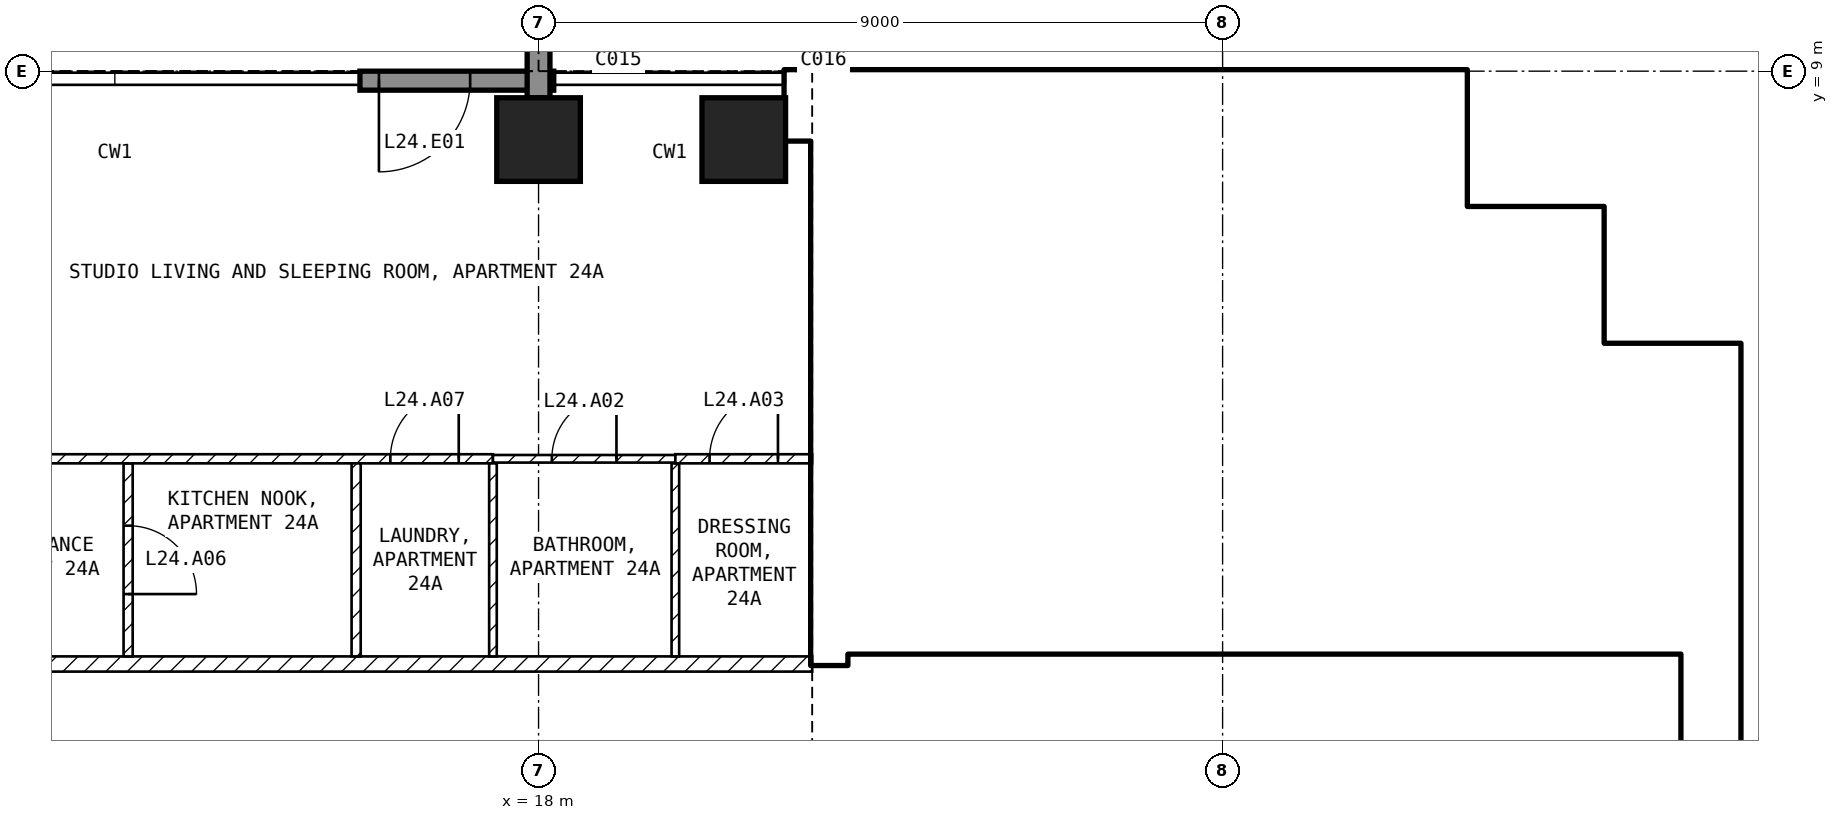
"""IFC4 building model, lengths in metres.
Left out: names, types, materials, properties, quantities, classifications, styles, units other than length and angle.
Written with IfcOpenShell. Run it as: python <this file> out.ifc"""

import sys

from ifc_helpers import new_model, si_unit, direction, frame, frame_2d, origin, origin_2d, place, context, subcontext, project, spatial, rectangle, extrude, element, fill, save


model = new_model("IFC4")
c1 = context("Model", 3, precision=1e-05, world=origin(), true_north=direction((0.0, 1.0)))
c2 = subcontext(c1, "Body", "Model", "MODEL_VIEW")
j1 = project(units=[si_unit("LENGTHUNIT", "METRE"), si_unit("PLANEANGLEUNIT", "RADIAN")], contexts=[c1])
p1 = place(None, origin())
s1 = spatial("IfcSite", under=j1, at=p1, CompositionType="ELEMENT")
p2 = place(p1, origin())
s2 = spatial("IfcBuilding", under=s1, at=p2, CompositionType="ELEMENT")
p3 = place(p2, frame((0.0, 0.0, 105.9)))
s3 = spatial("IfcBuildingStorey", under=s2, at=p3, CompositionType="ELEMENT", Elevation=105.9)
for number, where, z_axis, x_axis in (
    (1, (18.0, 8.1, -0.25), (0.0, 0.0, 1.0), (1.0, 0.0, 0.0)),
    (2, (20.7, 8.1, -0.25), (0.0, 0.0, 1.0), (1.0, 0.0, 0.0)),
):
    element("IfcColumn", number, at=place(p3, frame(where, z_axis=z_axis, x_axis=x_axis)), inside=s3, PredefinedType="COLUMN", context=c2, shape_type="SweptSolid", body=[
        extrude(rectangle(XDim=1.1, YDim=1.1, at=origin_2d()), origin(), (0.0, 0.0, 1.0), 3.5),
    ])
p4 = place(p3, frame((18.2, 8.875, 0.0), z_axis=(0.0, 0.0, 1.0), x_axis=(-1.0, 0.0, 0.0)))
e3 = element("IfcWall", 3, at=p4, inside=s3, PredefinedType="SOLIDWALL", context=c2, shape_type="SweptSolid", body=[
    extrude(rectangle(XDim=2.55, YDim=0.25, at=frame_2d((1.275, 0.0))), origin(), (0.0, 0.0, 1.0), 3.25),
])
p5 = place(p4, frame((1.1, 0.0, 0.0)))
e4 = element("IfcOpeningElement", 4, at=p5, cuts=e3, PredefinedType="OPENING", context=c2, shape_type="SweptSolid", body=[
    extrude(rectangle(XDim=1.2, YDim=2.4, at=frame_2d((0.6, 1.2))), frame((0.0, 0.135, 0.0), z_axis=(0.0, -1.0, 0.0), x_axis=(1.0, 0.0, 0.0)), (0.0, 0.0, 1.0), 0.27),
])
p6 = place(p3, frame((18.0, 8.65, 0.0), z_axis=(0.0, 0.0, 1.0), x_axis=(0.0, 1.0, 0.0)))
e5 = element("IfcWall", 5, at=p6, inside=s3, PredefinedType="SOLIDWALL", context=c2, shape_type="SweptSolid", body=[
    extrude(rectangle(XDim=3.09, YDim=0.3, at=frame_2d((1.545, 0.0))), origin(), (0.0, 0.0, 1.0), 3.25),
])
p7 = place(p3, frame((33.425, -4.65, 0.0), z_axis=(0.0, 0.0, 1.0), x_axis=(0.0, 1.0, 0.0)))
e6 = element("IfcWall", 6, at=p7, inside=s3, PredefinedType="SHEAR", context=c2, shape_type="SweptSolid", body=[
    extrude(rectangle(XDim=10.05, YDim=0.75, at=frame_2d((5.025, 0.0))), origin(), (0.0, 0.0, 1.0), 3.25),
])
for number, where, z_axis, x_axis in (
    (7, (31.25, 5.025, 0.0), (0.0, 0.0, 1.0), (1.0, 0.0, 0.0)),
    (8, (31.625, 5.4, 0.0), (0.0, 0.0, 1.0), (0.0, 1.0, 0.0)),
):
    element("IfcWall", number, at=place(p3, frame(where, z_axis=z_axis, x_axis=x_axis)), inside=s3, PredefinedType="SHEAR", context=c2, shape_type="SweptSolid", body=[
        extrude(rectangle(XDim=1.8, YDim=0.75, at=frame_2d((0.9, 0.0))), origin(), (0.0, 0.0, 1.0), 3.25),
    ])
p8 = place(p3, frame((29.075, 6.825, 0.0), z_axis=(0.0, 0.0, 1.0), x_axis=(1.0, 0.0, 0.0)))
e9 = element("IfcWall", 9, at=p8, inside=s3, PredefinedType="SHEAR", context=c2, shape_type="SweptSolid", body=[
    extrude(rectangle(XDim=2.175, YDim=0.75, at=frame_2d((1.087, 0.0))), origin(), (0.0, 0.0, 1.0), 3.25),
])
p9 = place(p3, frame((29.825, 7.2, 0.0), z_axis=(0.0, 0.0, 1.0), x_axis=(0.0, 1.0, 0.0)))
e10 = element("IfcWall", 10, at=p9, inside=s3, PredefinedType="SHEAR", context=c2, shape_type="SweptSolid", body=[
    extrude(rectangle(XDim=1.8, YDim=0.75, at=frame_2d((0.9, 0.0))), origin(), (0.0, 0.0, 1.0), 3.25),
])
p10 = place(p3, frame((21.25, 8.55, 0.0), z_axis=(0.0, 0.0, 1.0), x_axis=(1.0, 0.0, 0.0)))
e11 = element("IfcWall", 11, at=p10, inside=s3, PredefinedType="SHEAR", context=c2, shape_type="SweptSolid", body=[
    extrude(rectangle(XDim=8.2, YDim=0.9, at=frame_2d((4.1, 0.0))), origin(), (0.0, 0.0, 1.0), 3.25),
])
p11 = place(p3, frame((21.825, 1.2, 0.0), z_axis=(0.0, 0.0, 1.0), x_axis=(0.0, 1.0, 0.0)))
e12 = element("IfcWall", 12, at=p11, inside=s3, PredefinedType="SHEAR", context=c2, shape_type="SweptSolid", body=[
    extrude(rectangle(XDim=6.9, YDim=0.45, at=frame_2d((3.45, 0.0))), origin(), (0.0, 0.0, 1.0), 3.25),
])
p12 = place(p3, frame((22.05, 1.45, 0.0), z_axis=(0.0, 0.0, 1.0), x_axis=(1.0, 0.0, 0.0)))
e13 = element("IfcWall", 13, at=p12, inside=s3, PredefinedType="SOLIDWALL", context=c2, shape_type="SweptSolid", body=[
    extrude(rectangle(XDim=11.0, YDim=0.2, at=frame_2d((5.5, 0.0))), origin(), (0.0, 0.0, 1.0), 3.25),
])
p13 = place(p12, frame((0.75, 0.0, 0.0)))
e14 = element("IfcOpeningElement", 14, at=p13, cuts=e13, PredefinedType="OPENING", context=c2, shape_type="SweptSolid", body=[
    extrude(rectangle(XDim=1.0, YDim=2.1, at=frame_2d((0.5, 1.05))), frame((0.0, 0.11, 0.0), z_axis=(0.0, -1.0, 0.0), x_axis=(1.0, 0.0, 0.0)), (0.0, 0.0, 1.0), 0.22),
])
p14 = place(p12, frame((3.25, 0.0, 0.0)))
e15 = element("IfcOpeningElement", 15, at=p14, cuts=e13, PredefinedType="OPENING", context=c2, shape_type="SweptSolid", body=[
    extrude(rectangle(XDim=1.0, YDim=2.1, at=frame_2d((0.5, 1.05))), frame((0.0, 0.11, 0.0), z_axis=(0.0, -1.0, 0.0), x_axis=(1.0, 0.0, 0.0)), (0.0, 0.0, 1.0), 0.22),
])
p15 = place(p12, frame((9.075, 0.0, 0.0)))
e16 = element("IfcOpeningElement", 16, at=p15, cuts=e13, PredefinedType="OPENING", context=c2, shape_type="SweptSolid", body=[
    extrude(rectangle(XDim=0.9, YDim=2.1, at=frame_2d((0.45, 1.05))), frame((0.0, 0.11, 0.0), z_axis=(0.0, -1.0, 0.0), x_axis=(1.0, 0.0, 0.0)), (0.0, 0.0, 1.0), 0.22),
])
p16 = place(p3, frame((22.05, 5.15, 0.0), z_axis=(0.0, 0.0, 1.0), x_axis=(1.0, 0.0, 0.0)))
e17 = element("IfcWall", 17, at=p16, inside=s3, PredefinedType="SOLIDWALL", context=c2, shape_type="SweptSolid", body=[
    extrude(rectangle(XDim=6.3, YDim=0.2, at=frame_2d((3.15, 0.0))), origin(), (0.0, 0.0, 1.0), 3.25),
])
p17 = place(p16, frame((0.2, 0.0, 0.0)))
e18 = element("IfcOpeningElement", 18, at=p17, cuts=e17, PredefinedType="OPENING", context=c2, shape_type="SweptSolid", body=[
    extrude(rectangle(XDim=1.0, YDim=2.1, at=frame_2d((0.5, 1.05))), frame((0.0, 0.11, 0.0), z_axis=(0.0, -1.0, 0.0), x_axis=(1.0, 0.0, 0.0)), (0.0, 0.0, 1.0), 0.22),
])
p18 = place(p3, frame((28.25, 5.25, 0.0), z_axis=(0.0, 0.0, 1.0), x_axis=(0.0, 1.0, 0.0)))
e19 = element("IfcWall", 19, at=p18, inside=s3, PredefinedType="SOLIDWALL", context=c2, shape_type="SweptSolid", body=[
    extrude(rectangle(XDim=2.85, YDim=0.2, at=frame_2d((1.425, 0.0))), origin(), (0.0, 0.0, 1.0), 3.25),
])
p19 = place(p3, frame((27.2, 3.95, 0.0), z_axis=(0.0, 0.0, 1.0), x_axis=(1.0, 0.0, 0.0)))
e20 = element("IfcWall", 20, at=p19, inside=s3, PredefinedType="SOLIDWALL", context=c2, shape_type="SweptSolid", body=[
    extrude(rectangle(XDim=5.85, YDim=0.2, at=frame_2d((2.925, 0.0))), origin(), (0.0, 0.0, 1.0), 3.25),
])
p20 = place(p3, frame((27.1, 1.55, 0.0), z_axis=(0.0, 0.0, 1.0), x_axis=(0.0, 1.0, 0.0)))
e21 = element("IfcWall", 21, at=p20, inside=s3, PredefinedType="SOLIDWALL", context=c2, shape_type="SweptSolid", body=[
    extrude(rectangle(XDim=3.5, YDim=0.2, at=frame_2d((1.75, 0.0))), origin(), (0.0, 0.0, 1.0), 3.25),
])
p21 = place(p20, frame((0.6, 0.0, 0.0)))
e22 = element("IfcOpeningElement", 22, at=p21, cuts=e21, PredefinedType="OPENING", context=c2, shape_type="SweptSolid", body=[
    extrude(rectangle(XDim=1.1, YDim=2.1, at=frame_2d((0.55, 1.05))), frame((0.0, 0.11, 0.0), z_axis=(0.0, -1.0, 0.0), x_axis=(1.0, 0.0, 0.0)), (0.0, 0.0, 1.0), 0.22),
])
p22 = place(p20, frame((2.6, 0.0, 0.0)))
e23 = element("IfcOpeningElement", 23, at=p22, cuts=e21, PredefinedType="OPENING", context=c2, shape_type="SweptSolid", body=[
    extrude(rectangle(XDim=0.8, YDim=2.1, at=frame_2d((0.4, 1.05))), frame((0.0, 0.11, 0.0), z_axis=(0.0, -1.0, 0.0), x_axis=(1.0, 0.0, 0.0)), (0.0, 0.0, 1.0), 0.22),
])
p23 = place(p3, frame((30.0, 1.55, 0.0), z_axis=(0.0, 0.0, 1.0), x_axis=(0.0, 1.0, 0.0)))
e24 = element("IfcWall", 24, at=p23, inside=s3, PredefinedType="SOLIDWALL", context=c2, shape_type="SweptSolid", body=[
    extrude(rectangle(XDim=2.3, YDim=0.2, at=frame_2d((1.15, 0.0))), origin(), (0.0, 0.0, 1.0), 3.25),
])
p24 = place(p3, frame((29.0, 4.05, 0.0), z_axis=(0.0, 0.0, 1.0), x_axis=(0.0, 1.0, 0.0)))
e25 = element("IfcWall", 25, at=p24, inside=s3, PredefinedType="PARTITIONING", context=c2, shape_type="SweptSolid", body=[
    extrude(rectangle(XDim=4.05, YDim=0.15, at=frame_2d((2.025, 0.0))), origin(), (0.0, 0.0, 1.0), 3.25),
])
p25 = place(p24, frame((0.1, 0.0, 0.0)))
e26 = element("IfcOpeningElement", 26, at=p25, cuts=e25, PredefinedType="OPENING", context=c2, shape_type="SweptSolid", body=[
    extrude(rectangle(XDim=0.8, YDim=2.1, at=frame_2d((0.4, 1.05))), frame((0.0, 0.085, 0.0), z_axis=(0.0, -1.0, 0.0), x_axis=(1.0, 0.0, 0.0)), (0.0, 0.0, 1.0), 0.17),
])
p26 = place(p3, frame((4.4, 1.2, 0.0), z_axis=(0.0, 0.0, 1.0), x_axis=(1.0, 0.0, 0.0)))
e27 = element("IfcWall", 27, at=p26, inside=s3, PredefinedType="PARTITIONING", context=c2, shape_type="SweptSolid", body=[
    extrude(rectangle(XDim=17.2, YDim=0.2, at=frame_2d((8.6, 0.0))), origin(), (0.0, 0.0, 1.0), 3.25),
])
p27 = place(p26, frame((5.9, 0.0, 0.0)))
e28 = element("IfcOpeningElement", 28, at=p27, cuts=e27, PredefinedType="OPENING", context=c2, shape_type="SweptSolid", body=[
    extrude(rectangle(XDim=1.0, YDim=2.1, at=frame_2d((0.5, 1.05))), frame((0.0, 0.11, 0.0), z_axis=(0.0, -1.0, 0.0), x_axis=(1.0, 0.0, 0.0)), (0.0, 0.0, 1.0), 0.22),
])
p28 = place(p3, frame((12.6, 3.84, 0.0), z_axis=(0.0, 0.0, 1.0), x_axis=(0.0, -1.0, 0.0)))
e29 = element("IfcWall", 29, at=p28, inside=s3, PredefinedType="PARTITIONING", context=c2, shape_type="SweptSolid", body=[
    extrude(rectangle(XDim=2.54, YDim=0.12, at=frame_2d((1.27, 0.0))), origin(), (0.0, 0.0, 1.0), 3.25),
])
p29 = place(p28, frame((0.82, 0.0, 0.0)))
e30 = element("IfcOpeningElement", 30, at=p29, cuts=e29, PredefinedType="OPENING", context=c2, shape_type="SweptSolid", body=[
    extrude(rectangle(XDim=0.9, YDim=2.1, at=frame_2d((0.45, 1.05))), frame((0.0, 0.07, 0.0), z_axis=(0.0, -1.0, 0.0), x_axis=(1.0, 0.0, 0.0)), (0.0, 0.0, 1.0), 0.14),
])
p30 = place(p3, frame((8.94, 3.9, 0.0), z_axis=(0.0, 0.0, 1.0), x_axis=(1.0, 0.0, 0.0)))
e31 = element("IfcWall", 31, at=p30, inside=s3, PredefinedType="PARTITIONING", context=c2, shape_type="SweptSolid", body=[
    extrude(rectangle(XDim=8.46, YDim=0.12, at=frame_2d((4.23, 0.0))), origin(), (0.0, 0.0, 1.0), 3.25),
])
p31 = place(p30, frame((7.11, 0.0, 0.0)))
e32 = element("IfcOpeningElement", 32, at=p31, cuts=e31, PredefinedType="OPENING", context=c2, shape_type="SweptSolid", body=[
    extrude(rectangle(XDim=0.9, YDim=2.1, at=frame_2d((0.45, 1.05))), frame((0.0, 0.07, 0.0), z_axis=(0.0, -1.0, 0.0), x_axis=(1.0, 0.0, 0.0)), (0.0, 0.0, 1.0), 0.14),
])
p32 = place(p30, frame((1.41, 0.0, 0.0)))
e33 = element("IfcOpeningElement", 33, at=p32, cuts=e31, PredefinedType="OPENING", context=c2, shape_type="SweptSolid", body=[
    extrude(rectangle(XDim=0.9, YDim=2.1, at=frame_2d((0.45, 1.05))), frame((0.0, 0.07, 0.0), z_axis=(0.0, -1.0, 0.0), x_axis=(1.0, 0.0, 0.0)), (0.0, 0.0, 1.0), 0.14),
])
p33 = place(p3, frame((15.6, 3.84, 0.0), z_axis=(0.0, 0.0, 1.0), x_axis=(0.0, -1.0, 0.0)))
e34 = element("IfcWall", 34, at=p33, inside=s3, PredefinedType="PARTITIONING", context=c2, shape_type="SweptSolid", body=[
    extrude(rectangle(XDim=2.54, YDim=0.12, at=frame_2d((1.27, 0.0))), origin(), (0.0, 0.0, 1.0), 3.25),
])
for number, where, z_axis, x_axis in (
    (35, (17.4, 3.84, 0.0), (0.0, 0.0, 1.0), (0.0, -1.0, 0.0)),
    (36, (19.8, 3.84, 0.0), (0.0, 0.0, 1.0), (0.0, -1.0, 0.0)),
):
    element("IfcWall", number, at=place(p3, frame(where, z_axis=z_axis, x_axis=x_axis)), inside=s3, PredefinedType="PARTITIONING", context=c2, shape_type="SweptSolid", body=[
        extrude(rectangle(XDim=2.54, YDim=0.1, at=frame_2d((1.27, 0.0))), origin(), (0.0, 0.0, 1.0), 3.25),
    ])
p34 = place(p3, frame((17.4, 3.9, 0.0), z_axis=(0.0, 0.0, 1.0), x_axis=(1.0, 0.0, 0.0)))
e37 = element("IfcWall", 37, at=p34, inside=s3, PredefinedType="PARTITIONING", context=c2, shape_type="SweptSolid", body=[
    extrude(rectangle(XDim=2.4, YDim=0.1, at=frame_2d((1.2, 0.0))), origin(), (0.0, 0.0, 1.0), 3.25),
])
p35 = place(p34, frame((0.775, 0.0, 0.0)))
e38 = element("IfcOpeningElement", 38, at=p35, cuts=e37, PredefinedType="OPENING", context=c2, shape_type="SweptSolid", body=[
    extrude(rectangle(XDim=0.85, YDim=2.1, at=frame_2d((0.425, 1.05))), frame((0.0, 0.06, 0.0), z_axis=(0.0, -1.0, 0.0), x_axis=(1.0, 0.0, 0.0)), (0.0, 0.0, 1.0), 0.12),
])
p36 = place(p3, frame((19.8, 3.9, 0.0), z_axis=(0.0, 0.0, 1.0), x_axis=(1.0, 0.0, 0.0)))
e39 = element("IfcWall", 39, at=p36, inside=s3, PredefinedType="PARTITIONING", context=c2, shape_type="SweptSolid", body=[
    extrude(rectangle(XDim=1.8, YDim=0.12, at=frame_2d((0.9, 0.0))), origin(), (0.0, 0.0, 1.0), 3.25),
])
p37 = place(p36, frame((0.45, 0.0, 0.0)))
e40 = element("IfcOpeningElement", 40, at=p37, cuts=e39, PredefinedType="OPENING", context=c2, shape_type="SweptSolid", body=[
    extrude(rectangle(XDim=0.9, YDim=2.1, at=frame_2d((0.45, 1.05))), frame((0.0, 0.07, 0.0), z_axis=(0.0, -1.0, 0.0), x_axis=(1.0, 0.0, 0.0)), (0.0, 0.0, 1.0), 0.14),
])
p38 = place(p5, origin())
e41 = element("IfcDoor", 41, at=p38, inside=s3, OperationType="SINGLE_SWING_RIGHT", PredefinedType="DOOR", context=c2, shape_type="SweptSolid", body=[
    extrude(rectangle(XDim=1.2, YDim=2.4, at=frame_2d((0.6, 1.2))), frame((0.0, 0.025, 0.0), z_axis=(0.0, -1.0, 0.0), x_axis=(1.0, 0.0, 0.0)), (0.0, 0.0, 1.0), 0.05),
])
fill(e4, e41)
p39 = place(p21, origin())
e42 = element("IfcDoor", 42, at=p39, inside=s3, OperationType="DOUBLE_DOOR_SLIDING", PredefinedType="DOOR", context=c2, shape_type="SweptSolid", body=[
    extrude(rectangle(XDim=1.1, YDim=2.1, at=frame_2d((0.55, 1.05))), frame((0.0, 0.025, 0.0), z_axis=(0.0, -1.0, 0.0), x_axis=(1.0, 0.0, 0.0)), (0.0, 0.0, 1.0), 0.05),
])
fill(e22, e42)
p40 = place(p17, origin())
e43 = element("IfcDoor", 43, at=p40, inside=s3, OperationType="SINGLE_SWING_LEFT", PredefinedType="DOOR", context=c2, shape_type="SweptSolid", body=[
    extrude(rectangle(XDim=1.0, YDim=2.1, at=frame_2d((0.5, 1.05))), frame((0.0, 0.025, 0.0), z_axis=(0.0, -1.0, 0.0), x_axis=(1.0, 0.0, 0.0)), (0.0, 0.0, 1.0), 0.05),
])
fill(e18, e43)
p41 = place(p13, origin())
e44 = element("IfcDoor", 44, at=p41, inside=s3, OperationType="SINGLE_SWING_LEFT", PredefinedType="DOOR", context=c2, shape_type="SweptSolid", body=[
    extrude(rectangle(XDim=1.0, YDim=2.1, at=frame_2d((0.5, 1.05))), frame((0.0, 0.025, 0.0), z_axis=(0.0, -1.0, 0.0), x_axis=(1.0, 0.0, 0.0)), (0.0, 0.0, 1.0), 0.05),
])
fill(e14, e44)
p42 = place(p14, origin())
e45 = element("IfcDoor", 45, at=p42, inside=s3, OperationType="SINGLE_SWING_LEFT", PredefinedType="DOOR", context=c2, shape_type="SweptSolid", body=[
    extrude(rectangle(XDim=1.0, YDim=2.1, at=frame_2d((0.5, 1.05))), frame((0.0, 0.025, 0.0), z_axis=(0.0, -1.0, 0.0), x_axis=(1.0, 0.0, 0.0)), (0.0, 0.0, 1.0), 0.05),
])
fill(e15, e45)
p43 = place(p22, origin())
e46 = element("IfcDoor", 46, at=p43, inside=s3, OperationType="SINGLE_SWING_LEFT", PredefinedType="DOOR", context=c2, shape_type="SweptSolid", body=[
    extrude(rectangle(XDim=0.8, YDim=2.1, at=frame_2d((0.4, 1.05))), frame((0.0, 0.025, 0.0), z_axis=(0.0, -1.0, 0.0), x_axis=(1.0, 0.0, 0.0)), (0.0, 0.0, 1.0), 0.05),
])
fill(e23, e46)
p44 = place(p25, origin())
e47 = element("IfcDoor", 47, at=p44, inside=s3, OperationType="SINGLE_SWING_LEFT", PredefinedType="DOOR", context=c2, shape_type="SweptSolid", body=[
    extrude(rectangle(XDim=0.8, YDim=2.1, at=frame_2d((0.4, 1.05))), frame((0.0, 0.025, 0.0), z_axis=(0.0, -1.0, 0.0), x_axis=(1.0, 0.0, 0.0)), (0.0, 0.0, 1.0), 0.05),
])
fill(e26, e47)
p45 = place(p15, origin())
e48 = element("IfcDoor", 48, at=p45, inside=s3, OperationType="SINGLE_SWING_LEFT", PredefinedType="DOOR", context=c2, shape_type="SweptSolid", body=[
    extrude(rectangle(XDim=0.9, YDim=2.1, at=frame_2d((0.45, 1.05))), frame((0.0, 0.025, 0.0), z_axis=(0.0, -1.0, 0.0), x_axis=(1.0, 0.0, 0.0)), (0.0, 0.0, 1.0), 0.05),
])
fill(e16, e48)
p46 = place(p35, origin())
e49 = element("IfcDoor", 49, at=p46, inside=s3, OperationType="SINGLE_SWING_RIGHT", PredefinedType="DOOR", context=c2, shape_type="SweptSolid", body=[
    extrude(rectangle(XDim=0.85, YDim=2.1, at=frame_2d((0.425, 1.05))), frame((0.0, 0.025, 0.0), z_axis=(0.0, -1.0, 0.0), x_axis=(1.0, 0.0, 0.0)), (0.0, 0.0, 1.0), 0.05),
])
fill(e38, e49)
p47 = place(p37, origin())
e50 = element("IfcDoor", 50, at=p47, inside=s3, OperationType="SINGLE_SWING_RIGHT", PredefinedType="DOOR", context=c2, shape_type="SweptSolid", body=[
    extrude(rectangle(XDim=0.9, YDim=2.1, at=frame_2d((0.45, 1.05))), frame((0.0, 0.025, 0.0), z_axis=(0.0, -1.0, 0.0), x_axis=(1.0, 0.0, 0.0)), (0.0, 0.0, 1.0), 0.05),
])
fill(e40, e50)
p48 = place(p29, origin())
e51 = element("IfcDoor", 51, at=p48, inside=s3, OperationType="SINGLE_SWING_RIGHT", PredefinedType="DOOR", context=c2, shape_type="SweptSolid", body=[
    extrude(rectangle(XDim=0.9, YDim=2.1, at=frame_2d((0.45, 1.05))), frame((0.0, 0.025, 0.0), z_axis=(0.0, -1.0, 0.0), x_axis=(1.0, 0.0, 0.0)), (0.0, 0.0, 1.0), 0.05),
])
fill(e30, e51)
p49 = place(p31, origin())
e52 = element("IfcDoor", 52, at=p49, inside=s3, OperationType="SINGLE_SWING_RIGHT", PredefinedType="DOOR", context=c2, shape_type="SweptSolid", body=[
    extrude(rectangle(XDim=0.9, YDim=2.1, at=frame_2d((0.45, 1.05))), frame((0.0, 0.025, 0.0), z_axis=(0.0, -1.0, 0.0), x_axis=(1.0, 0.0, 0.0)), (0.0, 0.0, 1.0), 0.05),
])
fill(e32, e52)
save(model, sys.argv[1])
